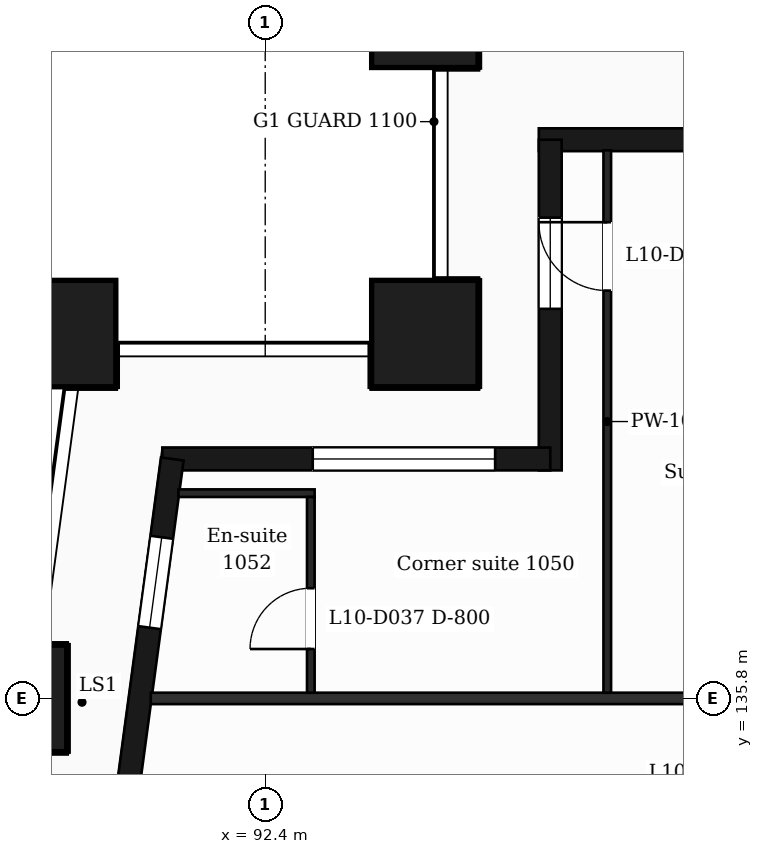
"""IFC4 building model, lengths in metres.
Left out: names, types, materials, properties, quantities, classifications, styles, units other than length and angle.
Written with IfcOpenShell. Run it as: python <this file> out.ifc"""

import sys

from ifc_helpers import new_model, si_unit, direction, frame, frame_2d, origin, origin_2d, place, context, subcontext, project, spatial, rectangle, extrude, element, fill, save


model = new_model("IFC4")
c1 = context("Model", 3, precision=1e-05, world=origin(), true_north=direction((0.0, 1.0)))
c2 = subcontext(c1, "Body", "Model", "MODEL_VIEW")
j1 = project(units=[si_unit("LENGTHUNIT", "METRE"), si_unit("PLANEANGLEUNIT", "RADIAN")], contexts=[c1])
p1 = place(None, origin())
s1 = spatial("IfcSite", under=j1, at=p1, CompositionType="ELEMENT")
p2 = place(p1, origin())
s2 = spatial("IfcBuilding", under=s1, at=p2, CompositionType="ELEMENT")
p3 = place(p2, frame((0.0, 0.0, 53.0)))
s3 = spatial("IfcBuildingStorey", under=s2, at=p3, CompositionType="ELEMENT", Elevation=53.0)
for number, where, z_axis, x_axis in (
    (1, (94.5, 140.6, 0.0), (0.0, 0.0, 1.0), (1.0, 0.0, 0.0)),
    (2, (89.735, 140.6, 0.0), (0.0, 0.0, 1.0), (1.0, 0.0, 0.0)),
    (3, (89.088, 135.8, 0.0), (0.0, 0.0, 1.0), (1.0, 0.0, 0.0)),
    (4, (94.5, 144.8, 0.0), (0.0, 0.0, 1.0), (1.0, 0.0, 0.0)),
):
    element("IfcColumn", number, at=place(p3, frame(where, z_axis=z_axis, x_axis=x_axis)), inside=s3, PredefinedType="COLUMN", context=c2, shape_type="SweptSolid", body=[
        extrude(rectangle(XDim=1.4, YDim=1.4, at=origin_2d()), origin(), (0.0, 0.0, 1.0), 3.5),
    ])
p4 = place(p3, frame((110.4, 143.15, 0.0), z_axis=(0.0, 0.0, 1.0), x_axis=(-1.0, 0.0, 0.0)))
e5 = element("IfcWall", 5, at=p4, inside=s3, PredefinedType="SOLIDWALL", context=c2, shape_type="SweptSolid", body=[
    extrude(rectangle(XDim=14.4, YDim=0.3, at=frame_2d((7.2, 0.0))), origin(), (0.0, 0.0, 1.0), 3.18),
])
p5 = place(p4, frame((2.1, 0.0, 0.9)))
e6 = element("IfcOpeningElement", 6, at=p5, cuts=e5, PredefinedType="OPENING", context=c2, shape_type="SweptSolid", body=[
    extrude(rectangle(XDim=2.4, YDim=2.1, at=frame_2d((1.2, 1.05))), frame((0.0, 0.16, 0.0), z_axis=(0.0, -1.0, 0.0), x_axis=(1.0, 0.0, 0.0)), (0.0, 0.0, 1.0), 0.32),
])
p6 = place(p4, frame((6.9, 0.0, 0.0)))
e7 = element("IfcOpeningElement", 7, at=p6, cuts=e5, PredefinedType="OPENING", context=c2, shape_type="SweptSolid", body=[
    extrude(rectangle(XDim=1.2, YDim=2.4, at=frame_2d((0.6, 1.2))), frame((0.0, 0.16, 0.0), z_axis=(0.0, -1.0, 0.0), x_axis=(1.0, 0.0, 0.0)), (0.0, 0.0, 1.0), 0.32),
])
p7 = place(p4, frame((11.1, 0.0, 0.9)))
e8 = element("IfcOpeningElement", 8, at=p7, cuts=e5, PredefinedType="OPENING", context=c2, shape_type="SweptSolid", body=[
    extrude(rectangle(XDim=1.2, YDim=2.1, at=frame_2d((0.6, 1.05))), frame((0.0, 0.16, 0.0), z_axis=(0.0, -1.0, 0.0), x_axis=(1.0, 0.0, 0.0)), (0.0, 0.0, 1.0), 0.32),
])
p8 = place(p3, frame((96.15, 143.15, 0.0), z_axis=(0.0, 0.0, 1.0), x_axis=(0.0, -1.0, 0.0)))
e9 = element("IfcWall", 9, at=p8, inside=s3, PredefinedType="SOLIDWALL", context=c2, shape_type="SweptSolid", body=[
    extrude(rectangle(XDim=4.35, YDim=0.3, at=frame_2d((2.175, 0.0))), origin(), (0.0, 0.0, 1.0), 3.18),
])
p9 = place(p8, frame((1.025, 0.0, 0.9)))
e10 = element("IfcOpeningElement", 10, at=p9, cuts=e9, PredefinedType="OPENING", context=c2, shape_type="SweptSolid", body=[
    extrude(rectangle(XDim=1.2, YDim=2.1, at=frame_2d((0.6, 1.05))), frame((0.0, 0.16, 0.0), z_axis=(0.0, -1.0, 0.0), x_axis=(1.0, 0.0, 0.0)), (0.0, 0.0, 1.0), 0.32),
])
p10 = place(p3, frame((96.15, 138.95, 0.0), z_axis=(0.0, 0.0, 1.0), x_axis=(-1.0, 0.0, 0.0)))
e11 = element("IfcWall", 11, at=p10, inside=s3, PredefinedType="SOLIDWALL", context=c2, shape_type="SweptSolid", body=[
    extrude(rectangle(XDim=5.104, YDim=0.3, at=frame_2d((2.552, 0.0))), origin(), (0.0, 0.0, 1.0), 3.18),
])
p11 = place(p10, frame((0.725, 0.0, 0.9)))
e12 = element("IfcOpeningElement", 12, at=p11, cuts=e11, PredefinedType="OPENING", context=c2, shape_type="SweptSolid", body=[
    extrude(rectangle(XDim=2.4, YDim=2.1, at=frame_2d((1.2, 1.05))), frame((0.0, 0.16, 0.0), z_axis=(0.0, -1.0, 0.0), x_axis=(1.0, 0.0, 0.0)), (0.0, 0.0, 1.0), 0.32),
])
p12 = place(p3, frame((91.177, 138.95, 0.0), z_axis=(0.0, 0.0, 1.0), x_axis=(-0.133426664613, -0.991058689065, 0.0)))
e13 = element("IfcWall", 13, at=p12, inside=s3, PredefinedType="SOLIDWALL", context=c2, shape_type="SweptSolid", body=[
    extrude(rectangle(XDim=6.609, YDim=0.3, at=frame_2d((3.305, 0.0))), origin(), (0.0, 0.0, 1.0), 3.18),
])
p13 = place(p12, frame((1.039, 0.0, 0.9)))
e14 = element("IfcOpeningElement", 14, at=p13, cuts=e13, PredefinedType="OPENING", context=c2, shape_type="SweptSolid", body=[
    extrude(rectangle(XDim=1.2, YDim=2.1, at=frame_2d((0.6, 1.05))), frame((0.0, 0.16, 0.0), z_axis=(0.0, -1.0, 0.0), x_axis=(1.0, 0.0, 0.0)), (0.0, 0.0, 1.0), 0.32),
])
p14 = place(p12, frame((4.294, 0.0, 0.0)))
e15 = element("IfcOpeningElement", 15, at=p14, cuts=e13, PredefinedType="OPENING", context=c2, shape_type="SweptSolid", body=[
    extrude(rectangle(XDim=1.2, YDim=2.4, at=frame_2d((0.6, 1.2))), frame((0.0, 0.16, 0.0), z_axis=(0.0, -1.0, 0.0), x_axis=(1.0, 0.0, 0.0)), (0.0, 0.0, 1.0), 0.32),
])
p15 = place(p3, frame((90.895, 135.8, 0.0), z_axis=(0.0, 0.0, 1.0), x_axis=(1.0, 0.0, 0.0)))
e16 = element("IfcWall", 16, at=p15, inside=s3, PredefinedType="PARTITIONING", context=c2, shape_type="SweptSolid", body=[
    extrude(rectangle(XDim=45.011, YDim=0.15, at=frame_2d((22.505, 0.0))), origin(), (0.0, 0.0, 1.0), 3.18),
])
p16 = place(p15, frame((7.675, 0.0, 0.0)))
e17 = element("IfcOpeningElement", 17, at=p16, cuts=e16, PredefinedType="OPENING", context=c2, shape_type="SweptSolid", body=[
    extrude(rectangle(XDim=1.0, YDim=2.1, at=frame_2d((0.5, 1.05))), frame((0.0, 0.085, 0.0), z_axis=(0.0, -1.0, 0.0), x_axis=(1.0, 0.0, 0.0)), (0.0, 0.0, 1.0), 0.17),
])
p17 = place(p15, frame((13.969, 0.0, 0.0)))
e18 = element("IfcOpeningElement", 18, at=p17, cuts=e16, PredefinedType="OPENING", context=c2, shape_type="SweptSolid", body=[
    extrude(rectangle(XDim=0.95, YDim=2.1, at=frame_2d((0.475, 1.05))), frame((0.0, 0.085, 0.0), z_axis=(0.0, -1.0, 0.0), x_axis=(1.0, 0.0, 0.0)), (0.0, 0.0, 1.0), 0.17),
])
p18 = place(p15, frame((24.393, 0.0, 0.0)))
e19 = element("IfcOpeningElement", 19, at=p18, cuts=e16, PredefinedType="OPENING", context=c2, shape_type="SweptSolid", body=[
    extrude(rectangle(XDim=0.95, YDim=2.1, at=frame_2d((0.475, 1.05))), frame((0.0, 0.085, 0.0), z_axis=(0.0, -1.0, 0.0), x_axis=(1.0, 0.0, 0.0)), (0.0, 0.0, 1.0), 0.17),
])
p19 = place(p15, frame((27.692, 0.0, 0.0)))
e20 = element("IfcOpeningElement", 20, at=p19, cuts=e16, PredefinedType="OPENING", context=c2, shape_type="SweptSolid", body=[
    extrude(rectangle(XDim=0.95, YDim=2.1, at=frame_2d((0.475, 1.05))), frame((0.0, 0.085, 0.0), z_axis=(0.0, -1.0, 0.0), x_axis=(1.0, 0.0, 0.0)), (0.0, 0.0, 1.0), 0.17),
])
p20 = place(p15, frame((32.531, 0.0, 0.0)))
e21 = element("IfcOpeningElement", 21, at=p20, cuts=e16, PredefinedType="OPENING", context=c2, shape_type="SweptSolid", body=[
    extrude(rectangle(XDim=0.95, YDim=2.1, at=frame_2d((0.475, 1.05))), frame((0.0, 0.085, 0.0), z_axis=(0.0, -1.0, 0.0), x_axis=(1.0, 0.0, 0.0)), (0.0, 0.0, 1.0), 0.17),
])
p21 = place(p15, frame((39.814, 0.0, 0.0)))
e22 = element("IfcOpeningElement", 22, at=p21, cuts=e16, PredefinedType="OPENING", context=c2, shape_type="SweptSolid", body=[
    extrude(rectangle(XDim=0.95, YDim=2.1, at=frame_2d((0.475, 1.05))), frame((0.0, 0.085, 0.0), z_axis=(0.0, -1.0, 0.0), x_axis=(1.0, 0.0, 0.0)), (0.0, 0.0, 1.0), 0.17),
])
p22 = place(p3, frame((91.258, 138.5, 0.0), z_axis=(0.0, 0.0, 1.0), x_axis=(1.0, 0.0, 0.0)))
e23 = element("IfcWall", 23, at=p22, inside=s3, PredefinedType="PARTITIONING", context=c2, shape_type="SweptSolid", body=[
    extrude(rectangle(XDim=1.792, YDim=0.1, at=frame_2d((0.896, 0.0))), origin(), (0.0, 0.0, 1.0), 3.18),
])
p23 = place(p3, frame((93.0, 135.875, 0.0), z_axis=(0.0, 0.0, 1.0), x_axis=(0.0, 1.0, 0.0)))
e24 = element("IfcWall", 24, at=p23, inside=s3, PredefinedType="PARTITIONING", context=c2, shape_type="SweptSolid", body=[
    extrude(rectangle(XDim=2.575, YDim=0.1, at=frame_2d((1.288, 0.0))), origin(), (0.0, 0.0, 1.0), 3.18),
])
p24 = place(p23, frame((0.575, 0.0, 0.0)))
e25 = element("IfcOpeningElement", 25, at=p24, cuts=e24, PredefinedType="OPENING", context=c2, shape_type="SweptSolid", body=[
    extrude(rectangle(XDim=0.8, YDim=2.1, at=frame_2d((0.4, 1.05))), frame((0.0, 0.06, 0.0), z_axis=(0.0, -1.0, 0.0), x_axis=(1.0, 0.0, 0.0)), (0.0, 0.0, 1.0), 0.12),
])
p25 = place(p3, frame((96.9, 135.875, 0.0), z_axis=(0.0, 0.0, 1.0), x_axis=(0.0, 1.0, 0.0)))
e26 = element("IfcWall", 26, at=p25, inside=s3, PredefinedType="PARTITIONING", context=c2, shape_type="SweptSolid", body=[
    extrude(rectangle(XDim=7.135, YDim=0.1, at=frame_2d((3.567, 0.0))), origin(), (0.0, 0.0, 1.0), 3.18),
])
p26 = place(p25, frame((5.29, 0.0, 0.0)))
e27 = element("IfcOpeningElement", 27, at=p26, cuts=e26, PredefinedType="OPENING", context=c2, shape_type="SweptSolid", body=[
    extrude(rectangle(XDim=0.9, YDim=2.1, at=frame_2d((0.45, 1.05))), frame((0.0, 0.06, 0.0), z_axis=(0.0, -1.0, 0.0), x_axis=(1.0, 0.0, 0.0)), (0.0, 0.0, 1.0), 0.12),
])
p27 = place(p9, origin())
e28 = element("IfcWindow", 28, at=p27, inside=s3, PartitioningType="SINGLE_PANEL", PredefinedType="WINDOW", context=c2, shape_type="SweptSolid", body=[
    extrude(rectangle(XDim=1.2, YDim=2.1, at=frame_2d((0.6, 1.05))), frame((0.0, 0.03, 0.0), z_axis=(0.0, -1.0, 0.0), x_axis=(1.0, 0.0, 0.0)), (0.0, 0.0, 1.0), 0.06),
])
fill(e10, e28)
p28 = place(p11, origin())
e29 = element("IfcWindow", 29, at=p28, inside=s3, PartitioningType="SINGLE_PANEL", PredefinedType="WINDOW", context=c2, shape_type="SweptSolid", body=[
    extrude(rectangle(XDim=2.4, YDim=2.1, at=frame_2d((1.2, 1.05))), frame((0.0, 0.03, 0.0), z_axis=(0.0, -1.0, 0.0), x_axis=(1.0, 0.0, 0.0)), (0.0, 0.0, 1.0), 0.06),
])
fill(e12, e29)
p29 = place(p13, origin())
e30 = element("IfcWindow", 30, at=p29, inside=s3, PartitioningType="SINGLE_PANEL", PredefinedType="WINDOW", context=c2, shape_type="SweptSolid", body=[
    extrude(rectangle(XDim=1.2, YDim=2.1, at=frame_2d((0.6, 1.05))), frame((0.0, 0.03, 0.0), z_axis=(0.0, -1.0, 0.0), x_axis=(1.0, 0.0, 0.0)), (0.0, 0.0, 1.0), 0.06),
])
fill(e14, e30)
p30 = place(p26, origin())
e31 = element("IfcDoor", 31, at=p30, inside=s3, OperationType="SINGLE_SWING_RIGHT", PredefinedType="DOOR", context=c2, shape_type="SweptSolid", body=[
    extrude(rectangle(XDim=0.9, YDim=2.1, at=frame_2d((0.45, 1.05))), frame((0.0, 0.025, 0.0), z_axis=(0.0, -1.0, 0.0), x_axis=(1.0, 0.0, 0.0)), (0.0, 0.0, 1.0), 0.05),
])
fill(e27, e31)
p31 = place(p24, origin())
e32 = element("IfcDoor", 32, at=p31, inside=s3, OperationType="SINGLE_SWING_LEFT", PredefinedType="DOOR", context=c2, shape_type="SweptSolid", body=[
    extrude(rectangle(XDim=0.8, YDim=2.1, at=frame_2d((0.4, 1.05))), frame((0.0, 0.025, 0.0), z_axis=(0.0, -1.0, 0.0), x_axis=(1.0, 0.0, 0.0)), (0.0, 0.0, 1.0), 0.05),
])
fill(e25, e32)
save(model, sys.argv[1])
